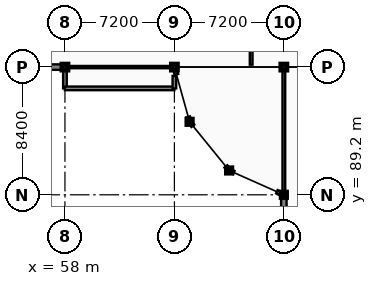
"""IFC4 building model, lengths in metres.
Left out: names, types, materials, properties, quantities, classifications, styles, units other than length and angle.
Written with IfcOpenShell. Run it as: python <this file> out.ifc"""

import sys

from ifc_helpers import new_model, si_unit, direction, frame, frame_2d, origin, origin_2d, place, context, subcontext, project, spatial, rectangle, extrude, element, fill, save


model = new_model("IFC4")
c1 = context("Model", 3, precision=1e-05, world=origin(), true_north=direction((0.0, 1.0)))
c2 = subcontext(c1, "Body", "Model", "MODEL_VIEW")
j1 = project(units=[si_unit("LENGTHUNIT", "METRE"), si_unit("PLANEANGLEUNIT", "RADIAN")], contexts=[c1])
p1 = place(None, origin())
s1 = spatial("IfcSite", under=j1, at=p1, CompositionType="ELEMENT")
p2 = place(p1, origin())
s2 = spatial("IfcBuilding", under=s1, at=p2, CompositionType="ELEMENT")
p3 = place(p2, frame((0.0, 0.0, 17.7)))
s3 = spatial("IfcBuildingStorey", under=s2, at=p3, CompositionType="ELEMENT", Elevation=17.7)
for number, where, z_axis, x_axis in (
    (1, (58.0, 97.6, 0.0), (0.0, 0.0, 1.0), (1.0, 0.0, 0.0)),
    (2, (65.2, 97.6, 0.0), (0.0, 0.0, 1.0), (1.0, 0.0, 0.0)),
):
    element("IfcColumn", number, at=place(p3, frame(where, z_axis=z_axis, x_axis=x_axis)), inside=s3, PredefinedType="COLUMN", context=c2, shape_type="SweptSolid", body=[
        extrude(rectangle(XDim=0.4, YDim=0.4, at=origin_2d()), origin(), (0.0, 0.0, 1.0), 3.9),
    ])
for number, where, z_axis, x_axis in (
    (3, (66.2, 94.0, 0.0), (0.0, 0.0, 1.0), (1.0, 0.0, 0.0)),
    (4, (68.8, 90.8, 0.0), (0.0, 0.0, 1.0), (1.0, 0.0, 0.0)),
    (5, (72.4, 89.2, 0.0), (0.0, 0.0, 1.0), (1.0, 0.0, 0.0)),
):
    element("IfcColumn", number, at=place(p3, frame(where, z_axis=z_axis, x_axis=x_axis)), inside=s3, PredefinedType="COLUMN", context=c2, shape_type="SweptSolid", body=[
        extrude(rectangle(XDim=0.36, YDim=0.36, at=origin_2d()), origin(), (0.0, 0.0, 1.0), 3.9),
    ])
p4 = place(p3, frame((72.4, 97.6, 0.0), z_axis=(0.0, 0.0, 1.0), x_axis=(1.0, 0.0, 0.0)))
e6 = element("IfcColumn", 6, at=p4, inside=s3, PredefinedType="COLUMN", context=c2, shape_type="SweptSolid", body=[
    extrude(rectangle(XDim=0.4, YDim=0.4, at=origin_2d()), origin(), (0.0, 0.0, 1.0), 3.9),
])
p5 = place(p3, frame((58.0, 97.6, 0.0), z_axis=(0.0, 0.0, 1.0), x_axis=(1.0, 0.0, 0.0)))
e7 = element("IfcWall", 7, at=p5, inside=s3, PredefinedType="PARTITIONING", context=c2, shape_type="SweptSolid", body=[
    extrude(rectangle(XDim=7.2, YDim=0.15, at=frame_2d((3.6, 0.0))), origin(), (0.0, 0.0, 1.0), 3.39),
])
p6 = place(p5, frame((3.1, 0.0, -0.01)))
e8 = element("IfcOpeningElement", 8, at=p6, cuts=e7, PredefinedType="OPENING", context=c2, shape_type="SweptSolid", body=[
    extrude(rectangle(XDim=1.0, YDim=2.16, at=frame_2d((0.5, 1.08))), frame((0.0, 0.085, 0.0), z_axis=(0.0, -1.0, 0.0), x_axis=(1.0, 0.0, 0.0)), (0.0, 0.0, 1.0), 0.17),
])
p7 = place(p3, frame((70.25, 97.76, 0.0), z_axis=(0.0, 0.0, 1.0), x_axis=(0.0, 1.0, 0.0)))
e9 = element("IfcWall", 9, at=p7, inside=s3, PredefinedType="PARTITIONING", context=c2, shape_type="SweptSolid", body=[
    extrude(rectangle(XDim=4.19, YDim=0.18, at=frame_2d((2.095, 0.0))), origin(), (0.0, 0.0, 1.0), 3.54),
])
p8 = place(p3, frame((72.4, 89.2, 0.0), z_axis=(0.0, 0.0, 1.0), x_axis=(0.0, 1.0, 0.0)))
e10 = element("IfcWall", 10, at=p8, inside=s3, PredefinedType="PARTITIONING", context=c2, shape_type="SweptSolid", body=[
    extrude(rectangle(XDim=8.4, YDim=0.18, at=frame_2d((4.2, 0.0))), origin(), (0.0, 0.0, 1.0), 3.32),
])
p9 = place(p8, frame((3.4, 0.0, -0.01)))
e11 = element("IfcOpeningElement", 11, at=p9, cuts=e10, PredefinedType="OPENING", context=c2, shape_type="SweptSolid", body=[
    extrude(rectangle(XDim=1.6, YDim=2.21, at=frame_2d((0.8, 1.105))), frame((0.0, 0.1, 0.0), z_axis=(0.0, -1.0, 0.0), x_axis=(1.0, 0.0, 0.0)), (0.0, 0.0, 1.0), 0.2),
])
p10 = place(p3, frame((50.8, 97.6, 0.0), z_axis=(0.0, 0.0, 1.0), x_axis=(1.0, 0.0, 0.0)))
e12 = element("IfcWall", 12, at=p10, inside=s3, PredefinedType="SOLIDWALL", context=c2, shape_type="SweptSolid", body=[
    extrude(rectangle(XDim=7.2, YDim=0.36, at=frame_2d((3.6, 0.0))), origin(), (0.0, 0.0, 1.0), 3.4),
])
p11 = place(p10, frame((0.46, 0.0, 0.75)))
e13 = element("IfcOpeningElement", 13, at=p11, cuts=e12, PredefinedType="OPENING", context=c2, shape_type="SweptSolid", body=[
    extrude(rectangle(XDim=1.55, YDim=2.3, at=frame_2d((0.775, 1.15))), frame((0.0, 0.19, 0.0), z_axis=(0.0, -1.0, 0.0), x_axis=(1.0, 0.0, 0.0)), (0.0, 0.0, 1.0), 0.38),
])
p12 = place(p10, frame((5.06, 0.0, 0.75)))
e14 = element("IfcOpeningElement", 14, at=p12, cuts=e12, PredefinedType="OPENING", context=c2, shape_type="SweptSolid", body=[
    extrude(rectangle(XDim=1.55, YDim=2.3, at=frame_2d((0.775, 1.15))), frame((0.0, 0.19, 0.0), z_axis=(0.0, -1.0, 0.0), x_axis=(1.0, 0.0, 0.0)), (0.0, 0.0, 1.0), 0.38),
])
p13 = place(p3, frame((72.4, 89.2, 0.0), z_axis=(0.0, 0.0, 1.0), x_axis=(0.0, -1.0, 0.0)))
e15 = element("IfcWall", 15, at=p13, inside=s3, PredefinedType="SOLIDWALL", context=c2, shape_type="SweptSolid", body=[
    extrude(rectangle(XDim=8.4, YDim=0.36, at=frame_2d((4.2, 0.0))), origin(), (0.0, 0.0, 1.0), 3.32),
])
p14 = place(p13, frame((0.46, 0.0, 0.75)))
e16 = element("IfcOpeningElement", 16, at=p14, cuts=e15, PredefinedType="OPENING", context=c2, shape_type="SweptSolid", body=[
    extrude(rectangle(XDim=1.55, YDim=2.3, at=frame_2d((0.775, 1.15))), frame((0.0, 0.19, 0.0), z_axis=(0.0, -1.0, 0.0), x_axis=(1.0, 0.0, 0.0)), (0.0, 0.0, 1.0), 0.38),
])
p15 = place(p13, frame((6.26, 0.0, 0.75)))
e17 = element("IfcOpeningElement", 17, at=p15, cuts=e15, PredefinedType="OPENING", context=c2, shape_type="SweptSolid", body=[
    extrude(rectangle(XDim=1.55, YDim=2.3, at=frame_2d((0.775, 1.15))), frame((0.0, 0.19, 0.0), z_axis=(0.0, -1.0, 0.0), x_axis=(1.0, 0.0, 0.0)), (0.0, 0.0, 1.0), 0.38),
])
p16 = place(p3, frame((65.275, 97.33, 0.0), z_axis=(0.0, 0.0, 1.0), x_axis=(0.267529355044, -0.963549710285, 0.0)))
e18 = element("IfcWall", 18, at=p16, inside=s3, PredefinedType="SOLIDWALL", context=c2, shape_type="SweptSolid", body=[
    extrude(rectangle(XDim=0.22, YDim=0.24, at=frame_2d((0.11, 0.0))), origin(), (0.0, 0.0, 1.0), 3.39),
])
for number, where, z_axis, x_axis in (
    (19, (66.109, 94.328, 0.0), (0.0, 0.0, 1.0), (0.268, -0.963, 0.0)),
    (20, (66.2, 94.0, 0.0), (0.0, 0.0, 1.0), (0.63, -0.776, 0.0)),
    (21, (68.586, 91.064, 0.0), (0.0, 0.0, 1.0), (0.63, -0.776, 0.0)),
):
    element("IfcWall", number, at=place(p3, frame(where, z_axis=z_axis, x_axis=x_axis)), inside=s3, PredefinedType="SOLIDWALL", context=c2, shape_type="SweptSolid", body=[
        extrude(rectangle(XDim=0.34, YDim=0.24, at=frame_2d((0.17, 0.0))), origin(), (0.0, 0.0, 1.0), 3.39),
    ])
p17 = place(p3, frame((68.8, 90.8, 0.0), z_axis=(0.0, 0.0, 1.0), x_axis=(0.913633745955, -0.406538286329, 0.0)))
e22 = element("IfcWall", 22, at=p17, inside=s3, PredefinedType="SOLIDWALL", context=c2, shape_type="SweptSolid", body=[
    extrude(rectangle(XDim=0.34, YDim=0.24, at=frame_2d((0.17, 0.0))), origin(), (0.0, 0.0, 1.0), 3.39),
])
p18 = place(p3, frame((71.943, 89.403, 0.0), z_axis=(0.0, 0.0, 1.0), x_axis=(0.913719959968, -0.406344477944, 0.0)))
e23 = element("IfcWall", 23, at=p18, inside=s3, PredefinedType="SOLIDWALL", context=c2, shape_type="SweptSolid", body=[
    extrude(rectangle(XDim=0.22, YDim=0.24, at=frame_2d((0.11, 0.0))), origin(), (0.0, 0.0, 1.0), 3.39),
])
p19 = place(p3, frame((58.0, 97.45, 0.0), z_axis=(0.0, 0.0, 1.0), x_axis=(0.0, -1.0, 0.0)))
e24 = element("IfcWall", 24, at=p19, inside=s3, PredefinedType="SOLIDWALL", context=c2, shape_type="SweptSolid", body=[
    extrude(rectangle(XDim=1.25, YDim=0.24, at=frame_2d((0.625, 0.0))), origin(), (0.0, 0.0, 1.0), 3.39),
])
p20 = place(p3, frame((58.0, 96.2, 0.0), z_axis=(0.0, 0.0, 1.0), x_axis=(1.0, 0.0, 0.0)))
e25 = element("IfcWall", 25, at=p20, inside=s3, PredefinedType="SOLIDWALL", context=c2, shape_type="SweptSolid", body=[
    extrude(rectangle(XDim=7.2, YDim=0.24, at=frame_2d((3.6, 0.0))), origin(), (0.0, 0.0, 1.0), 3.39),
])
p21 = place(p20, frame((0.46, 0.0, 0.65)))
e26 = element("IfcOpeningElement", 26, at=p21, cuts=e25, PredefinedType="OPENING", context=c2, shape_type="SweptSolid", body=[
    extrude(rectangle(XDim=2.4, YDim=2.1, at=frame_2d((1.2, 1.05))), frame((0.0, 0.13, 0.0), z_axis=(0.0, -1.0, 0.0), x_axis=(1.0, 0.0, 0.0)), (0.0, 0.0, 1.0), 0.26),
])
p22 = place(p20, frame((4.26, 0.0, 0.65)))
e27 = element("IfcOpeningElement", 27, at=p22, cuts=e25, PredefinedType="OPENING", context=c2, shape_type="SweptSolid", body=[
    extrude(rectangle(XDim=2.4, YDim=2.1, at=frame_2d((1.2, 1.05))), frame((0.0, 0.13, 0.0), z_axis=(0.0, -1.0, 0.0), x_axis=(1.0, 0.0, 0.0)), (0.0, 0.0, 1.0), 0.26),
])
p23 = place(p3, frame((65.2, 96.2, 0.0), z_axis=(0.0, 0.0, 1.0), x_axis=(0.0, 1.0, 0.0)))
e28 = element("IfcWall", 28, at=p23, inside=s3, PredefinedType="SOLIDWALL", context=c2, shape_type="SweptSolid", body=[
    extrude(rectangle(XDim=0.82, YDim=0.24, at=frame_2d((0.41, 0.0))), origin(), (0.0, 0.0, 1.0), 3.39),
])
p24 = place(p6, frame((1.0, 0.0, 0.01), z_axis=(0.0, 0.0, 1.0), x_axis=(-1.0, 0.0, 0.0)))
e29 = element("IfcDoor", 29, at=p24, inside=s3, OperationType="SINGLE_SWING_RIGHT", PredefinedType="DOOR", context=c2, shape_type="SweptSolid", body=[
    extrude(rectangle(XDim=1.0, YDim=2.15, at=frame_2d((0.5, 1.075))), frame((0.0, 0.025, 0.0), z_axis=(0.0, -1.0, 0.0), x_axis=(1.0, 0.0, 0.0)), (0.0, 0.0, 1.0), 0.05),
])
fill(e8, e29)
p25 = place(p9, frame((0.0, 0.0, 0.01)))
e30 = element("IfcDoor", 30, at=p25, inside=s3, OperationType="DOUBLE_SWING_LEFT", PredefinedType="DOOR", context=c2, shape_type="SweptSolid", body=[
    extrude(rectangle(XDim=1.6, YDim=2.2, at=frame_2d((0.8, 1.1))), frame((0.0, 0.025, 0.0), z_axis=(0.0, -1.0, 0.0), x_axis=(1.0, 0.0, 0.0)), (0.0, 0.0, 1.0), 0.05),
])
fill(e11, e30)
p26 = place(p12, origin())
e31 = element("IfcWindow", 31, at=p26, inside=s3, PartitioningType="DOUBLE_PANEL_HORIZONTAL", PredefinedType="WINDOW", context=c2, shape_type="SweptSolid", body=[
    extrude(rectangle(XDim=1.55, YDim=2.3, at=frame_2d((0.775, 1.15))), frame((0.0, 0.03, 0.0), z_axis=(0.0, -1.0, 0.0), x_axis=(1.0, 0.0, 0.0)), (0.0, 0.0, 1.0), 0.06),
])
fill(e14, e31)
p27 = place(p14, origin())
e32 = element("IfcWindow", 32, at=p27, inside=s3, PartitioningType="DOUBLE_PANEL_HORIZONTAL", PredefinedType="WINDOW", context=c2, shape_type="SweptSolid", body=[
    extrude(rectangle(XDim=1.55, YDim=2.3, at=frame_2d((0.775, 1.15))), frame((0.0, 0.03, 0.0), z_axis=(0.0, -1.0, 0.0), x_axis=(1.0, 0.0, 0.0)), (0.0, 0.0, 1.0), 0.06),
])
fill(e16, e32)
p28 = place(p21, origin())
e33 = element("IfcWindow", 33, at=p28, inside=s3, PartitioningType="TRIPLE_PANEL_VERTICAL", PredefinedType="WINDOW", context=c2, shape_type="SweptSolid", body=[
    extrude(rectangle(XDim=2.4, YDim=2.1, at=frame_2d((1.2, 1.05))), frame((0.0, 0.03, 0.0), z_axis=(0.0, -1.0, 0.0), x_axis=(1.0, 0.0, 0.0)), (0.0, 0.0, 1.0), 0.06),
])
fill(e26, e33)
p29 = place(p22, origin())
e34 = element("IfcWindow", 34, at=p29, inside=s3, PartitioningType="TRIPLE_PANEL_VERTICAL", PredefinedType="WINDOW", context=c2, shape_type="SweptSolid", body=[
    extrude(rectangle(XDim=2.4, YDim=2.1, at=frame_2d((1.2, 1.05))), frame((0.0, 0.03, 0.0), z_axis=(0.0, -1.0, 0.0), x_axis=(1.0, 0.0, 0.0)), (0.0, 0.0, 1.0), 0.06),
])
fill(e27, e34)
save(model, sys.argv[1])
